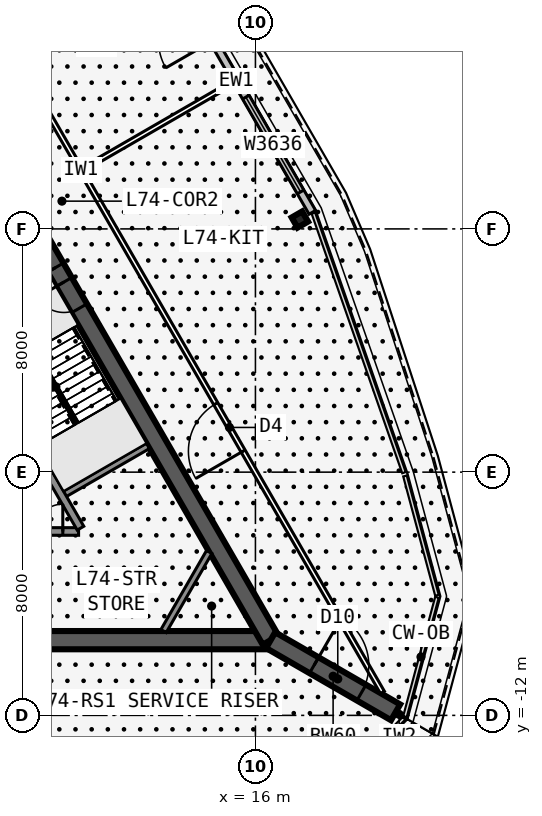
"""IFC4 building model, lengths in metres.
Left out: names, types, materials, properties, quantities, classifications, styles, units other than length and angle.
Written with IfcOpenShell. Run it as: python <this file> out.ifc"""

import sys

from ifc_helpers import new_model, si_unit, direction, frame, frame_2d, origin, origin_2d, place, context, subcontext, project, spatial, rectangle, i_section, extrude, element, fill, save


model = new_model("IFC4")
c1 = context("Model", 3, precision=1e-05, world=origin(), true_north=direction((0.0, 1.0)))
c2 = subcontext(c1, "Body", "Model", "MODEL_VIEW")
j1 = project(units=[si_unit("LENGTHUNIT", "METRE"), si_unit("PLANEANGLEUNIT", "RADIAN")], contexts=[c1])
p1 = place(None, origin())
s1 = spatial("IfcSite", under=j1, at=p1, CompositionType="ELEMENT")
p2 = place(p1, origin())
s2 = spatial("IfcBuilding", under=s1, at=p2, CompositionType="ELEMENT")
p3 = place(p2, frame((0.0, 0.0, 281.3)))
s3 = spatial("IfcBuildingStorey", under=s2, at=p3, CompositionType="ELEMENT", Elevation=281.3)
p4 = place(p3, frame((-16.5, -9.526, 0.0), z_axis=(0.0, 0.0, 1.0), x_axis=(1.0, 0.0, 0.0)))
e1 = element("IfcWall", 1, at=p4, inside=s3, PredefinedType="SHEAR", context=c2, shape_type="SweptSolid", body=[
    extrude(rectangle(XDim=33.0, YDim=0.6, at=frame_2d((16.5, 0.0))), origin(), (0.0, 0.0, 1.0), 5.5),
])
p5 = place(p4, frame((14.05, 0.0, 0.0)))
e2 = element("IfcOpeningElement", 2, at=p5, cuts=e1, PredefinedType="OPENING", context=c2, shape_type="SweptSolid", body=[
    extrude(rectangle(XDim=1.8, YDim=2.13, at=frame_2d((0.9, 1.065))), frame((0.0, 0.31, 0.0), z_axis=(0.0, -1.0, 0.0), x_axis=(1.0, 0.0, 0.0)), (0.0, 0.0, 1.0), 0.62),
])
p6 = place(p3, frame((-0.55, -5.951, 0.0), z_axis=(0.0, 0.0, 1.0), x_axis=(1.0, 0.0, 0.0)))
e3 = element("IfcWall", 3, at=p6, inside=s3, PredefinedType="SOLIDWALL", context=c2, shape_type="SweptSolid", body=[
    extrude(rectangle(XDim=10.733, YDim=0.25, at=frame_2d((5.366, 0.0))), origin(), (0.0, 0.0, 1.0), 5.25),
])
p7 = place(p6, frame((9.314, 0.0, 0.0)))
e4 = element("IfcOpeningElement", 4, at=p7, cuts=e3, PredefinedType="OPENING", context=c2, shape_type="SweptSolid", body=[
    extrude(rectangle(XDim=0.9, YDim=2.13, at=frame_2d((0.45, 1.065))), frame((0.0, 0.135, 0.0), z_axis=(0.0, -1.0, 0.0), x_axis=(1.0, 0.0, 0.0)), (0.0, 0.0, 1.0), 0.27),
])
p8 = place(p6, frame((1.05, 0.0, 0.0)))
e5 = element("IfcOpeningElement", 5, at=p8, cuts=e3, PredefinedType="OPENING", context=c2, shape_type="SweptSolid", body=[
    extrude(rectangle(XDim=1.1, YDim=2.13, at=frame_2d((0.55, 1.065))), frame((0.0, 0.135, 0.0), z_axis=(0.0, -1.0, 0.0), x_axis=(1.0, 0.0, 0.0)), (0.0, 0.0, 1.0), 0.27),
])
p9 = place(p6, frame((4.05, 0.0, 0.0)))
e6 = element("IfcOpeningElement", 6, at=p9, cuts=e3, PredefinedType="OPENING", context=c2, shape_type="SweptSolid", body=[
    extrude(rectangle(XDim=1.1, YDim=2.13, at=frame_2d((0.55, 1.065))), frame((0.0, 0.135, 0.0), z_axis=(0.0, -1.0, 0.0), x_axis=(1.0, 0.0, 0.0)), (0.0, 0.0, 1.0), 0.27),
])
p10 = place(p6, frame((7.0, 0.0, 0.0)))
e7 = element("IfcOpeningElement", 7, at=p10, cuts=e3, PredefinedType="OPENING", context=c2, shape_type="SweptSolid", body=[
    extrude(rectangle(XDim=1.1, YDim=2.13, at=frame_2d((0.55, 1.065))), frame((0.0, 0.135, 0.0), z_axis=(0.0, -1.0, 0.0), x_axis=(1.0, 0.0, 0.0)), (0.0, 0.0, 1.0), 0.27),
])
p11 = place(p3, frame((16.5, -9.526, 0.0), z_axis=(0.0, 0.0, 1.0), x_axis=(-0.499999749417, 0.866025548458, 0.0)))
e8 = element("IfcWall", 8, at=p11, inside=s3, PredefinedType="SHEAR", context=c2, shape_type="SweptSolid", body=[
    extrude(rectangle(XDim=33.0, YDim=0.6, at=frame_2d((16.5, 0.0))), origin(), (0.0, 0.0, 1.0), 5.5),
])
p12 = place(p11, frame((14.15, 0.0, 0.0)))
e9 = element("IfcOpeningElement", 9, at=p12, cuts=e8, PredefinedType="OPENING", context=c2, shape_type="SweptSolid", body=[
    extrude(rectangle(XDim=1.8, YDim=2.13, at=frame_2d((0.9, 1.065))), frame((0.0, 0.31, 0.0), z_axis=(0.0, -1.0, 0.0), x_axis=(1.0, 0.0, 0.0)), (0.0, 0.0, 1.0), 0.62),
])
p13 = place(p11, frame((12.6, 0.0, 0.0)))
e10 = element("IfcOpeningElement", 10, at=p13, cuts=e8, PredefinedType="OPENING", context=c2, shape_type="SweptSolid", body=[
    extrude(rectangle(XDim=1.0, YDim=2.13, at=frame_2d((0.5, 1.065))), frame((0.0, 0.31, 0.0), z_axis=(0.0, -1.0, 0.0), x_axis=(1.0, 0.0, 0.0)), (0.0, 0.0, 1.0), 0.62),
])
p14 = place(p3, frame((10.245, -5.843, 0.0), z_axis=(0.0, 0.0, 1.0), x_axis=(-0.499993009313, 0.866029439822, 0.0)))
e11 = element("IfcWall", 11, at=p14, inside=s3, PredefinedType="SOLIDWALL", context=c2, shape_type="SweptSolid", body=[
    extrude(rectangle(XDim=7.733, YDim=0.25, at=frame_2d((3.866, 0.0))), origin(), (0.0, 0.0, 1.0), 5.25),
])
p15 = place(p3, frame((9.629, -4.775, 0.0), z_axis=(0.0, 0.0, 1.0), x_axis=(0.865995643347, 0.500051543047, 0.0)))
e12 = element("IfcWall", 12, at=p15, inside=s3, PredefinedType="SOLIDWALL", context=c2, shape_type="SweptSolid", body=[
    extrude(rectangle(XDim=3.275, YDim=0.2, at=frame_2d((1.638, 0.0))), origin(), (0.0, 0.0, 1.0), 5.25),
])
p16 = place(p3, frame((16.5, -9.526, 0.0), z_axis=(0.0, 0.0, 1.0), x_axis=(0.866031398331, -0.499989616998, 0.0)))
e13 = element("IfcWall", 13, at=p16, inside=s3, PredefinedType="SHEAR", context=c2, shape_type="SweptSolid", body=[
    extrude(rectangle(XDim=4.746, YDim=0.6, at=frame_2d((2.373, 0.0))), origin(), (0.0, 0.0, 1.0), 5.5),
])
p17 = place(p16, frame((1.65, 0.0, 0.0)))
e14 = element("IfcOpeningElement", 14, at=p17, cuts=e13, PredefinedType="OPENING", context=c2, shape_type="SweptSolid", body=[
    extrude(rectangle(XDim=1.8, YDim=2.13, at=frame_2d((0.9, 1.065))), frame((0.0, 0.31, 0.0), z_axis=(0.0, -1.0, 0.0), x_axis=(1.0, 0.0, 0.0)), (0.0, 0.0, 1.0), 0.62),
])
p18 = place(p3, frame((17.461, 4.308, 0.0), z_axis=(0.0, 0.0, 1.0), x_axis=(0.866025403784, 0.5, 0.0)))
e15 = element("IfcColumn", 15, at=p18, inside=s3, PredefinedType="COLUMN", context=c2, shape_type="SweptSolid", body=[
    extrude(i_section(OverallWidth=0.399, OverallDepth=0.386, WebThickness=0.021, FlangeThickness=0.033, at=origin_2d()), origin(), (0.0, 0.0, 1.0), 5.5),
])
p19 = place(p3, frame((17.873, 4.545, 0.0), z_axis=(0.0, 0.0, 1.0), x_axis=(-0.500004234368, 0.866022959057, 0.0)))
e16 = element("IfcWall", 16, at=p19, inside=s3, PredefinedType="STANDARD", context=c2, shape_type="SweptSolid", body=[
    extrude(rectangle(XDim=10.0, YDim=0.25, at=frame_2d((5.0, 0.0))), origin(), (0.0, 0.0, 1.0), 5.25),
])
p20 = place(p19, frame((0.775, 0.0, 0.6)))
e17 = element("IfcOpeningElement", 17, at=p20, cuts=e16, PredefinedType="OPENING", context=c2, shape_type="SweptSolid", body=[
    extrude(rectangle(XDim=3.6, YDim=3.6, at=frame_2d((1.8, 1.8))), frame((0.0, 0.135, 0.0), z_axis=(0.0, -1.0, 0.0), x_axis=(1.0, 0.0, 0.0)), (0.0, 0.0, 1.0), 0.27),
])
p21 = place(p19, frame((6.525, 0.0, 0.0)))
e18 = element("IfcOpeningElement", 18, at=p21, cuts=e16, PredefinedType="OPENING", context=c2, shape_type="SweptSolid", body=[
    extrude(rectangle(XDim=1.8, YDim=2.4, at=frame_2d((0.9, 1.2))), frame((0.0, 0.135, 0.0), z_axis=(0.0, -1.0, 0.0), x_axis=(1.0, 0.0, 0.0)), (0.0, 0.0, 1.0), 0.27),
])
p22 = place(p3, frame((20.177, -11.245, 0.0), z_axis=(0.0, 0.0, 1.0), x_axis=(-0.499998875317, 0.866026053119, 0.0)))
e19 = element("IfcWall", 19, at=p22, inside=s3, PredefinedType="PARTITIONING", context=c2, shape_type="SweptSolid", body=[
    extrude(rectangle(XDim=39.654, YDim=0.15, at=frame_2d((19.827, 0.0))), origin(), (0.0, 0.0, 1.0), 5.25),
])
p23 = place(p22, frame((9.164, 0.0, 0.0)))
e20 = element("IfcOpeningElement", 20, at=p23, cuts=e19, PredefinedType="OPENING", context=c2, shape_type="SweptSolid", body=[
    extrude(rectangle(XDim=1.8, YDim=2.13, at=frame_2d((0.9, 1.065))), frame((0.0, 0.085, 0.0), z_axis=(0.0, -1.0, 0.0), x_axis=(1.0, 0.0, 0.0)), (0.0, 0.0, 1.0), 0.17),
])
p24 = place(p22, frame((28.69, 0.0, 0.0)))
e21 = element("IfcOpeningElement", 21, at=p24, cuts=e19, PredefinedType="OPENING", context=c2, shape_type="SweptSolid", body=[
    extrude(rectangle(XDim=1.8, YDim=2.13, at=frame_2d((0.9, 1.065))), frame((0.0, 0.085, 0.0), z_axis=(0.0, -1.0, 0.0), x_axis=(1.0, 0.0, 0.0)), (0.0, 0.0, 1.0), 0.17),
])
p25 = place(p3, frame((10.329, 5.963, 0.0), z_axis=(0.0, 0.0, 1.0), x_axis=(0.86601224135, 0.500022797313, 0.0)))
e22 = element("IfcWall", 22, at=p25, inside=s3, PredefinedType="PARTITIONING", context=c2, shape_type="SweptSolid", body=[
    extrude(rectangle(XDim=5.699, YDim=0.15, at=frame_2d((2.85, 0.0))), origin(), (0.0, 0.0, 1.0), 4.394),
])
p26 = place(p3, frame((20.61, -11.899, 0.0), z_axis=(0.0, 0.0, 1.0), x_axis=(0.866065156741, -0.499931139538, 0.0)))
e23 = element("IfcWall", 23, at=p26, inside=s3, PredefinedType="PARTITIONING", context=c2, shape_type="SweptSolid", body=[
    extrude(rectangle(XDim=0.27, YDim=0.15, at=frame_2d((0.135, 0.0))), origin(), (0.0, 0.0, 1.0), 5.25),
])
p27 = place(p3, frame((14.479, -6.626, 0.0), z_axis=(0.0, 0.0, 1.0), x_axis=(-0.499952404951, -0.866052881055, 0.0)))
e24 = element("IfcWall", 24, at=p27, inside=s3, PredefinedType="SOLIDWALL", context=c2, shape_type="SweptSolid", body=[
    extrude(rectangle(XDim=3.002, YDim=0.2, at=frame_2d((1.501, 0.0))), origin(), (0.0, 0.0, 1.0), 5.25),
])
p28 = place(p3, frame((10.135, -2.401, 0.0), z_axis=(0.0, 0.0, 1.0), x_axis=(-0.499992232847, 0.866029888106, 0.0)))
e25 = element("IfcWall", 25, at=p28, inside=s3, PredefinedType="SOLIDWALL", context=c2, shape_type="SweptSolid", body=[
    extrude(rectangle(XDim=2.794, YDim=0.1, at=frame_2d((1.397, 0.0))), origin(), (0.0, 0.0, 1.0), 5.5),
])
p29 = place(p20, origin())
e26 = element("IfcWindow", 26, at=p29, inside=s3, PartitioningType="SINGLE_PANEL", PredefinedType="WINDOW", context=c2, shape_type="SweptSolid", body=[
    extrude(rectangle(XDim=3.6, YDim=3.6, at=frame_2d((1.8, 1.8))), frame((0.0, 0.03, 0.0), z_axis=(0.0, -1.0, 0.0), x_axis=(1.0, 0.0, 0.0)), (0.0, 0.0, 1.0), 0.06),
])
fill(e17, e26)
p30 = place(p23, origin())
e27 = element("IfcDoor", 27, at=p30, inside=s3, OperationType="DOUBLE_DOOR_SINGLE_SWING", PredefinedType="DOOR", context=c2, shape_type="SweptSolid", body=[
    extrude(rectangle(XDim=1.8, YDim=2.13, at=frame_2d((0.9, 1.065))), frame((0.0, 0.025, 0.0), z_axis=(0.0, -1.0, 0.0), x_axis=(1.0, 0.0, 0.0)), (0.0, 0.0, 1.0), 0.05),
])
fill(e20, e27)
p31 = place(p12, origin())
e28 = element("IfcDoor", 28, at=p31, inside=s3, OperationType="DOUBLE_DOOR_SINGLE_SWING", PredefinedType="DOOR", context=c2, shape_type="SweptSolid", body=[
    extrude(rectangle(XDim=1.8, YDim=2.13, at=frame_2d((0.9, 1.065))), frame((0.0, 0.025, 0.0), z_axis=(0.0, -1.0, 0.0), x_axis=(1.0, 0.0, 0.0)), (0.0, 0.0, 1.0), 0.05),
])
fill(e9, e28)
p32 = place(p13, origin())
e29 = element("IfcDoor", 29, at=p32, inside=s3, OperationType="SINGLE_SWING_RIGHT", PredefinedType="DOOR", context=c2, shape_type="SweptSolid", body=[
    extrude(rectangle(XDim=1.0, YDim=2.13, at=frame_2d((0.5, 1.065))), frame((0.0, 0.025, 0.0), z_axis=(0.0, -1.0, 0.0), x_axis=(1.0, 0.0, 0.0)), (0.0, 0.0, 1.0), 0.05),
])
fill(e10, e29)
p33 = place(p17, origin())
e30 = element("IfcDoor", 30, at=p33, inside=s3, OperationType="DOUBLE_DOOR_DOUBLE_SWING", PredefinedType="DOOR", context=c2, shape_type="SweptSolid", body=[
    extrude(rectangle(XDim=1.8, YDim=2.13, at=frame_2d((0.9, 1.065))), frame((0.0, 0.025, 0.0), z_axis=(0.0, -1.0, 0.0), x_axis=(1.0, 0.0, 0.0)), (0.0, 0.0, 1.0), 0.05),
])
fill(e14, e30)
p34 = place(p7, origin())
e31 = element("IfcDoor", 31, at=p34, inside=s3, OperationType="SINGLE_SWING_RIGHT", PredefinedType="DOOR", context=c2, shape_type="SweptSolid", body=[
    extrude(rectangle(XDim=0.9, YDim=2.13, at=frame_2d((0.45, 1.065))), frame((0.0, 0.025, 0.0), z_axis=(0.0, -1.0, 0.0), x_axis=(1.0, 0.0, 0.0)), (0.0, 0.0, 1.0), 0.05),
])
fill(e4, e31)
save(model, sys.argv[1])
